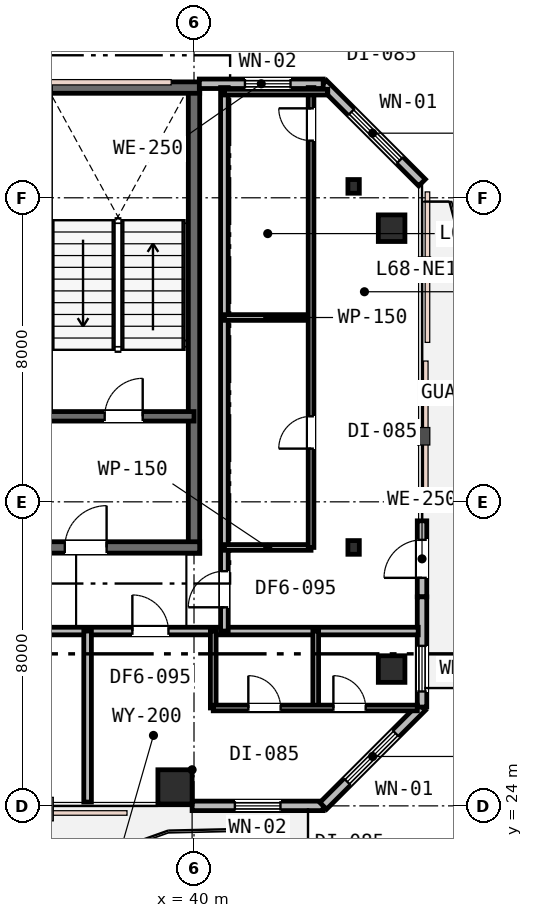
"""IFC4 building model, lengths in metres.
Left out: names, types, materials, properties, quantities, classifications, styles, units other than length and angle.
Written with IfcOpenShell. Run it as: python <this file> out.ifc"""

import sys

from ifc_helpers import new_model, si_unit, direction, frame, frame_2d, origin, origin_2d, place, context, subcontext, project, spatial, rectangle, i_section, extrude, element, fill, save


model = new_model("IFC4")
c1 = context("Model", 3, precision=1e-05, world=origin(), true_north=direction((0.0, 1.0)))
c2 = subcontext(c1, "Body", "Model", "MODEL_VIEW")
j1 = project(units=[si_unit("LENGTHUNIT", "METRE"), si_unit("PLANEANGLEUNIT", "RADIAN")], contexts=[c1])
p1 = place(None, origin())
s1 = spatial("IfcSite", under=j1, at=p1, CompositionType="ELEMENT")
p2 = place(p1, origin())
s2 = spatial("IfcBuilding", under=s1, at=p2, CompositionType="ELEMENT")
p3 = place(p2, frame((0.0, 0.0, 264.0)))
s3 = spatial("IfcBuildingStorey", under=s2, at=p3, CompositionType="ELEMENT", Elevation=264.0)
p4 = place(p3, frame((40.0, 30.65, 0.0), z_axis=(0.0, 0.0, 1.0), x_axis=(0.0, 1.0, 0.0)))
e1 = element("IfcWall", 1, at=p4, inside=s3, PredefinedType="SHEAR", context=c2, shape_type="SweptSolid", body=[
    extrude(rectangle(XDim=12.3, YDim=0.3, at=frame_2d((6.15, 0.0))), origin(), (0.0, 0.0, 1.0), 3.8),
])
p5 = place(p3, frame((15.85, 42.9, 0.0), z_axis=(0.0, 0.0, 1.0), x_axis=(1.0, 0.0, 0.0)))
e2 = element("IfcWall", 2, at=p5, inside=s3, PredefinedType="SHEAR", context=c2, shape_type="SweptSolid", body=[
    extrude(rectangle(XDim=24.3, YDim=0.3, at=frame_2d((12.15, 0.0))), origin(), (0.0, 0.0, 1.0), 3.8),
])
p6 = place(p3, frame((28.95, 30.8, 0.0), z_axis=(0.0, 0.0, 1.0), x_axis=(1.0, 0.0, 0.0)))
e3 = element("IfcWall", 3, at=p6, inside=s3, PredefinedType="SHEAR", context=c2, shape_type="SweptSolid", body=[
    extrude(rectangle(XDim=11.2, YDim=0.3, at=frame_2d((5.6, 0.0))), origin(), (0.0, 0.0, 1.0), 3.8),
])
p7 = place(p6, frame((7.65, 0.0, 0.0)))
e4 = element("IfcOpeningElement", 4, at=p7, cuts=e3, PredefinedType="OPENING", context=c2, shape_type="SweptSolid", body=[
    extrude(rectangle(XDim=1.1, YDim=2.15, at=frame_2d((0.55, 1.075))), frame((0.0, 0.16, 0.0), z_axis=(0.0, -1.0, 0.0), x_axis=(1.0, 0.0, 0.0)), (0.0, 0.0, 1.0), 0.32),
])
p8 = place(p3, frame((33.95, 34.25, 0.0), z_axis=(0.0, 0.0, 1.0), x_axis=(1.0, 0.0, 0.0)))
e5 = element("IfcWall", 5, at=p8, inside=s3, PredefinedType="SHEAR", context=c2, shape_type="SweptSolid", body=[
    extrude(rectangle(XDim=6.05, YDim=0.25, at=frame_2d((3.025, 0.0))), origin(), (0.0, 0.0, 1.0), 3.8),
])
p9 = place(p8, frame((3.7, 0.0, 0.0)))
e6 = element("IfcOpeningElement", 6, at=p9, cuts=e5, PredefinedType="OPENING", context=c2, shape_type="SweptSolid", body=[
    extrude(rectangle(XDim=1.0, YDim=2.15, at=frame_2d((0.5, 1.075))), frame((0.0, 0.135, 0.0), z_axis=(0.0, -1.0, 0.0), x_axis=(1.0, 0.0, 0.0)), (0.0, 0.0, 1.0), 0.27),
])
p10 = place(p8, frame((0.55, 0.0, 0.0)))
e7 = element("IfcOpeningElement", 7, at=p10, cuts=e5, PredefinedType="OPENING", context=c2, shape_type="SweptSolid", body=[
    extrude(rectangle(XDim=1.1, YDim=2.15, at=frame_2d((0.55, 1.075))), frame((0.0, 0.135, 0.0), z_axis=(0.0, -1.0, 0.0), x_axis=(1.0, 0.0, 0.0)), (0.0, 0.0, 1.0), 0.27),
])
p11 = place(p3, frame((39.5, 24.5, 0.0), z_axis=(0.0, 0.0, 1.0), x_axis=(1.0, 0.0, 0.0)))
e8 = element("IfcColumn", 8, at=p11, inside=s3, PredefinedType="COLUMN", context=c2, shape_type="SweptSolid", body=[
    extrude(rectangle(XDim=0.9, YDim=0.9, at=origin_2d()), origin(), (0.0, 0.0, 1.0), 3.8),
])
for number, where, z_axis, x_axis in (
    (9, (45.2, 27.6, 0.0), (0.0, 0.0, 1.0), (1.0, 0.0, 0.0)),
    (10, (45.2, 39.2, 0.0), (0.0, 0.0, 1.0), (1.0, 0.0, 0.0)),
):
    element("IfcColumn", number, at=place(p3, frame(where, z_axis=z_axis, x_axis=x_axis)), inside=s3, PredefinedType="COLUMN", context=c2, shape_type="SweptSolid", body=[
        extrude(rectangle(XDim=0.7, YDim=0.7, at=origin_2d()), origin(), (0.0, 0.0, 1.0), 3.8),
    ])
for number, where, z_axis, x_axis in (
    (11, (44.2, 30.8, 0.0), (0.0, 0.0, 1.0), (1.0, 0.0, 0.0)),
    (12, (44.2, 40.3, 0.0), (0.0, 0.0, 1.0), (1.0, 0.0, 0.0)),
):
    element("IfcColumn", number, at=place(p3, frame(where, z_axis=z_axis, x_axis=x_axis)), inside=s3, PredefinedType="COLUMN", context=c2, shape_type="SweptSolid", body=[
        extrude(i_section(OverallWidth=0.3, OverallDepth=0.36, WebThickness=0.013, FlangeThickness=0.022, FilletRadius=0.027, at=origin_2d()), origin(), (0.0, 0.0, 1.0), 3.8),
    ])
p12 = place(p3, frame((39.95, 24.0, 0.0), z_axis=(0.0, 0.0, 1.0), x_axis=(1.0, 0.0, 0.0)))
e13 = element("IfcWall", 13, at=p12, inside=s3, PredefinedType="STANDARD", context=c2, shape_type="SweptSolid", body=[
    extrude(rectangle(XDim=3.45, YDim=0.25, at=frame_2d((1.725, 0.0))), origin(), (0.0, 0.0, 1.0), 3.53),
])
p13 = place(p12, frame((1.125, 0.0, 0.85)))
e14 = element("IfcOpeningElement", 14, at=p13, cuts=e13, PredefinedType="OPENING", context=c2, shape_type="SweptSolid", body=[
    extrude(rectangle(XDim=1.2, YDim=1.6, at=frame_2d((0.6, 0.8))), frame((0.0, 0.135, 0.0), z_axis=(0.0, -1.0, 0.0), x_axis=(1.0, 0.0, 0.0)), (0.0, 0.0, 1.0), 0.27),
])
p14 = place(p3, frame((43.4, 24.0, 0.0), z_axis=(0.0, 0.0, 1.0), x_axis=(0.707106781187, 0.707106781187, 0.0)))
e15 = element("IfcWall", 15, at=p14, inside=s3, PredefinedType="STANDARD", context=c2, shape_type="SweptSolid", body=[
    extrude(rectangle(XDim=3.677, YDim=0.25, at=frame_2d((1.839, 0.0))), origin(), (0.0, 0.0, 1.0), 3.53),
])
p15 = place(p14, frame((0.896, 0.0, 0.75)))
e16 = element("IfcOpeningElement", 16, at=p15, cuts=e15, PredefinedType="OPENING", context=c2, shape_type="SweptSolid", body=[
    extrude(rectangle(XDim=1.8, YDim=1.85, at=frame_2d((0.9, 0.925))), frame((0.0, 0.135, 0.0), z_axis=(0.0, -1.0, 0.0), x_axis=(1.0, 0.0, 0.0)), (0.0, 0.0, 1.0), 0.27),
])
p16 = place(p3, frame((46.0, 29.5, 0.0), z_axis=(0.0, 0.0, 1.0), x_axis=(0.0, 1.0, 0.0)))
e17 = element("IfcWall", 17, at=p16, inside=s3, PredefinedType="STANDARD", context=c2, shape_type="SweptSolid", body=[
    extrude(rectangle(XDim=2.0, YDim=0.25, at=frame_2d((1.0, 0.0))), origin(), (0.0, 0.0, 1.0), 3.53),
])
p17 = place(p16, frame((0.5, 0.0, 0.0)))
e18 = element("IfcOpeningElement", 18, at=p17, cuts=e17, PredefinedType="OPENING", context=c2, shape_type="SweptSolid", body=[
    extrude(rectangle(XDim=1.0, YDim=2.15, at=frame_2d((0.5, 1.075))), frame((0.0, 0.135, 0.0), z_axis=(0.0, -1.0, 0.0), x_axis=(1.0, 0.0, 0.0)), (0.0, 0.0, 1.0), 0.27),
])
p18 = place(p3, frame((46.0, 26.6, 0.0), z_axis=(0.0, 0.0, 1.0), x_axis=(0.0, 1.0, 0.0)))
e19 = element("IfcWall", 19, at=p18, inside=s3, PredefinedType="STANDARD", context=c2, shape_type="SweptSolid", body=[
    extrude(rectangle(XDim=2.9, YDim=0.25, at=frame_2d((1.45, 0.0))), origin(), (0.0, 0.0, 1.0), 3.53),
])
p19 = place(p18, frame((0.41, 0.0, 0.85)))
e20 = element("IfcOpeningElement", 20, at=p19, cuts=e19, PredefinedType="OPENING", context=c2, shape_type="SweptSolid", body=[
    extrude(rectangle(XDim=1.2, YDim=1.6, at=frame_2d((0.6, 0.8))), frame((0.0, 0.135, 0.0), z_axis=(0.0, -1.0, 0.0), x_axis=(1.0, 0.0, 0.0)), (0.0, 0.0, 1.0), 0.27),
])
p20 = place(p3, frame((46.0, 40.4, 0.0), z_axis=(0.0, 0.0, 1.0), x_axis=(-0.707106781187, 0.707106781187, 0.0)))
e21 = element("IfcWall", 21, at=p20, inside=s3, PredefinedType="STANDARD", context=c2, shape_type="SweptSolid", body=[
    extrude(rectangle(XDim=3.677, YDim=0.25, at=frame_2d((1.839, 0.0))), origin(), (0.0, 0.0, 1.0), 3.53),
])
p21 = place(p20, frame((0.828, 0.0, 0.75)))
e22 = element("IfcOpeningElement", 22, at=p21, cuts=e21, PredefinedType="OPENING", context=c2, shape_type="SweptSolid", body=[
    extrude(rectangle(XDim=1.8, YDim=1.85, at=frame_2d((0.9, 0.925))), frame((0.0, 0.135, 0.0), z_axis=(0.0, -1.0, 0.0), x_axis=(1.0, 0.0, 0.0)), (0.0, 0.0, 1.0), 0.27),
])
p22 = place(p3, frame((43.4, 43.0, 0.0), z_axis=(0.0, 0.0, 1.0), x_axis=(-1.0, 0.0, 0.0)))
e23 = element("IfcWall", 23, at=p22, inside=s3, PredefinedType="STANDARD", context=c2, shape_type="SweptSolid", body=[
    extrude(rectangle(XDim=3.26, YDim=0.25, at=frame_2d((1.63, 0.0))), origin(), (0.0, 0.0, 1.0), 3.53),
])
p23 = place(p22, frame((0.86, 0.0, 0.85)))
e24 = element("IfcOpeningElement", 24, at=p23, cuts=e23, PredefinedType="OPENING", context=c2, shape_type="SweptSolid", body=[
    extrude(rectangle(XDim=1.2, YDim=1.6, at=frame_2d((0.6, 0.8))), frame((0.0, 0.135, 0.0), z_axis=(0.0, -1.0, 0.0), x_axis=(1.0, 0.0, 0.0)), (0.0, 0.0, 1.0), 0.27),
])
p24 = place(p3, frame((20.0, 28.6, 0.0), z_axis=(0.0, 0.0, 1.0), x_axis=(1.0, 0.0, 0.0)))
e25 = element("IfcWall", 25, at=p24, inside=s3, PredefinedType="PARTITIONING", context=c2, shape_type="SweptSolid", body=[
    extrude(rectangle(XDim=25.9, YDim=0.2, at=frame_2d((12.95, 0.0))), origin(), (0.0, 0.0, 1.0), 3.16),
])
p25 = place(p24, frame((7.025, 0.0, 0.0)))
e26 = element("IfcOpeningElement", 26, at=p25, cuts=e25, PredefinedType="OPENING", context=c2, shape_type="SweptSolid", body=[
    extrude(rectangle(XDim=0.95, YDim=2.15, at=frame_2d((0.475, 1.075))), frame((0.0, 0.11, 0.0), z_axis=(0.0, -1.0, 0.0), x_axis=(1.0, 0.0, 0.0)), (0.0, 0.0, 1.0), 0.22),
])
p26 = place(p24, frame((13.625, 0.0, 0.0)))
e27 = element("IfcOpeningElement", 27, at=p26, cuts=e25, PredefinedType="OPENING", context=c2, shape_type="SweptSolid", body=[
    extrude(rectangle(XDim=0.95, YDim=2.15, at=frame_2d((0.475, 1.075))), frame((0.0, 0.11, 0.0), z_axis=(0.0, -1.0, 0.0), x_axis=(1.0, 0.0, 0.0)), (0.0, 0.0, 1.0), 0.22),
])
p27 = place(p24, frame((18.378, 0.0, 0.0)))
e28 = element("IfcOpeningElement", 28, at=p27, cuts=e25, PredefinedType="OPENING", context=c2, shape_type="SweptSolid", body=[
    extrude(rectangle(XDim=0.95, YDim=2.15, at=frame_2d((0.475, 1.075))), frame((0.0, 0.11, 0.0), z_axis=(0.0, -1.0, 0.0), x_axis=(1.0, 0.0, 0.0)), (0.0, 0.0, 1.0), 0.22),
])
p28 = place(p3, frame((40.8, 28.6, 0.0), z_axis=(0.0, 0.0, 1.0), x_axis=(0.0, 1.0, 0.0)))
e29 = element("IfcWall", 29, at=p28, inside=s3, PredefinedType="PARTITIONING", context=c2, shape_type="SweptSolid", body=[
    extrude(rectangle(XDim=14.3, YDim=0.2, at=frame_2d((7.15, 0.0))), origin(), (0.0, 0.0, 1.0), 3.16),
])
p29 = place(p28, frame((0.625, 0.0, 0.0)))
e30 = element("IfcOpeningElement", 30, at=p29, cuts=e29, PredefinedType="OPENING", context=c2, shape_type="SweptSolid", body=[
    extrude(rectangle(XDim=0.95, YDim=2.15, at=frame_2d((0.475, 1.075))), frame((0.0, 0.11, 0.0), z_axis=(0.0, -1.0, 0.0), x_axis=(1.0, 0.0, 0.0)), (0.0, 0.0, 1.0), 0.22),
])
p30 = place(p3, frame((40.8, 30.8, 0.0), z_axis=(0.0, 0.0, 1.0), x_axis=(1.0, 0.0, 0.0)))
e31 = element("IfcWall", 31, at=p30, inside=s3, PredefinedType="PARTITIONING", context=c2, shape_type="SweptSolid", body=[
    extrude(rectangle(XDim=2.28, YDim=0.15, at=frame_2d((1.14, 0.0))), origin(), (0.0, 0.0, 1.0), 3.16),
])
p31 = place(p3, frame((40.8, 36.85, 0.0), z_axis=(0.0, 0.0, 1.0), x_axis=(1.0, 0.0, 0.0)))
e32 = element("IfcWall", 32, at=p31, inside=s3, PredefinedType="PARTITIONING", context=c2, shape_type="SweptSolid", body=[
    extrude(rectangle(XDim=2.28, YDim=0.15, at=frame_2d((1.14, 0.0))), origin(), (0.0, 0.0, 1.0), 3.53),
])
p32 = place(p3, frame((43.08, 30.8, 0.0), z_axis=(0.0, 0.0, 1.0), x_axis=(0.0, 1.0, 0.0)))
e33 = element("IfcWall", 33, at=p32, inside=s3, PredefinedType="PARTITIONING", context=c2, shape_type="SweptSolid", body=[
    extrude(rectangle(XDim=12.1, YDim=0.15, at=frame_2d((6.05, 0.0))), origin(), (0.0, 0.0, 1.0), 3.16),
])
p33 = place(p32, frame((2.6, 0.0, 0.0)))
e34 = element("IfcOpeningElement", 34, at=p33, cuts=e33, PredefinedType="OPENING", context=c2, shape_type="SweptSolid", body=[
    extrude(rectangle(XDim=0.85, YDim=2.15, at=frame_2d((0.425, 1.075))), frame((0.0, 0.085, 0.0), z_axis=(0.0, -1.0, 0.0), x_axis=(1.0, 0.0, 0.0)), (0.0, 0.0, 1.0), 0.17),
])
p34 = place(p32, frame((10.704, 0.0, 0.0)))
e35 = element("IfcOpeningElement", 35, at=p34, cuts=e33, PredefinedType="OPENING", context=c2, shape_type="SweptSolid", body=[
    extrude(rectangle(XDim=0.85, YDim=2.15, at=frame_2d((0.425, 1.075))), frame((0.0, 0.085, 0.0), z_axis=(0.0, -1.0, 0.0), x_axis=(1.0, 0.0, 0.0)), (0.0, 0.0, 1.0), 0.17),
])
p35 = place(p3, frame((40.8, 42.78, 0.0), z_axis=(0.0, 0.0, 1.0), x_axis=(1.0, 0.0, 0.0)))
e36 = element("IfcWall", 36, at=p35, inside=s3, PredefinedType="PARTITIONING", context=c2, shape_type="SweptSolid", body=[
    extrude(rectangle(XDim=2.72, YDim=0.15, at=frame_2d((1.36, 0.0))), origin(), (0.0, 0.0, 1.0), 3.53),
])
p36 = place(p3, frame((37.2, 24.1, 0.0), z_axis=(0.0, 0.0, 1.0), x_axis=(0.0, 1.0, 0.0)))
e37 = element("IfcWall", 37, at=p36, inside=s3, PredefinedType="PARTITIONING", context=c2, shape_type="SweptSolid", body=[
    extrude(rectangle(XDim=4.5, YDim=0.2, at=frame_2d((2.25, 0.0))), origin(), (0.0, 0.0, 1.0), 3.27),
])
for number, where, z_axis, x_axis in (
    (38, (40.506, 26.576, 0.0), (0.0, 0.0, 1.0), (0.0, 1.0, 0.0)),
    (39, (43.203, 26.576, 0.0), (0.0, 0.0, 1.0), (0.0, 1.0, 0.0)),
):
    element("IfcWall", number, at=place(p3, frame(where, z_axis=z_axis, x_axis=x_axis)), inside=s3, PredefinedType="PARTITIONING", context=c2, shape_type="SweptSolid", body=[
        extrude(rectangle(XDim=2.024, YDim=0.15, at=frame_2d((1.012, 0.0))), origin(), (0.0, 0.0, 1.0), 3.53),
    ])
p37 = place(p3, frame((40.506, 26.576, 0.0), z_axis=(0.0, 0.0, 1.0), x_axis=(1.0, 0.0, 0.0)))
e40 = element("IfcWall", 40, at=p37, inside=s3, PredefinedType="PARTITIONING", context=c2, shape_type="SweptSolid", body=[
    extrude(rectangle(XDim=5.37, YDim=0.15, at=frame_2d((2.685, 0.0))), origin(), (0.0, 0.0, 1.0), 3.53),
])
p38 = place(p37, frame((0.923, 0.0, 0.0)))
e41 = element("IfcOpeningElement", 41, at=p38, cuts=e40, PredefinedType="OPENING", context=c2, shape_type="SweptSolid", body=[
    extrude(rectangle(XDim=0.85, YDim=2.15, at=frame_2d((0.425, 1.075))), frame((0.0, 0.085, 0.0), z_axis=(0.0, -1.0, 0.0), x_axis=(1.0, 0.0, 0.0)), (0.0, 0.0, 1.0), 0.17),
])
p39 = place(p37, frame((3.162, 0.0, 0.0)))
e42 = element("IfcOpeningElement", 42, at=p39, cuts=e40, PredefinedType="OPENING", context=c2, shape_type="SweptSolid", body=[
    extrude(rectangle(XDim=0.85, YDim=2.15, at=frame_2d((0.425, 1.075))), frame((0.0, 0.085, 0.0), z_axis=(0.0, -1.0, 0.0), x_axis=(1.0, 0.0, 0.0)), (0.0, 0.0, 1.0), 0.17),
])
p40 = place(p13, origin())
e43 = element("IfcWindow", 43, at=p40, inside=s3, PartitioningType="SINGLE_PANEL", PredefinedType="WINDOW", context=c2, shape_type="SweptSolid", body=[
    extrude(rectangle(XDim=1.2, YDim=1.6, at=frame_2d((0.6, 0.8))), frame((0.0, 0.03, 0.0), z_axis=(0.0, -1.0, 0.0), x_axis=(1.0, 0.0, 0.0)), (0.0, 0.0, 1.0), 0.06),
])
fill(e14, e43)
p41 = place(p15, origin())
e44 = element("IfcWindow", 44, at=p41, inside=s3, PartitioningType="SINGLE_PANEL", PredefinedType="WINDOW", context=c2, shape_type="SweptSolid", body=[
    extrude(rectangle(XDim=1.8, YDim=1.85, at=frame_2d((0.9, 0.925))), frame((0.0, 0.03, 0.0), z_axis=(0.0, -1.0, 0.0), x_axis=(1.0, 0.0, 0.0)), (0.0, 0.0, 1.0), 0.06),
])
fill(e16, e44)
p42 = place(p17, origin())
e45 = element("IfcDoor", 45, at=p42, inside=s3, OperationType="SINGLE_SWING_LEFT", PredefinedType="DOOR", context=c2, shape_type="SweptSolid", body=[
    extrude(rectangle(XDim=1.0, YDim=2.15, at=frame_2d((0.5, 1.075))), frame((0.0, 0.025, 0.0), z_axis=(0.0, -1.0, 0.0), x_axis=(1.0, 0.0, 0.0)), (0.0, 0.0, 1.0), 0.05),
])
fill(e18, e45)
p43 = place(p19, origin())
e46 = element("IfcWindow", 46, at=p43, inside=s3, PartitioningType="SINGLE_PANEL", PredefinedType="WINDOW", context=c2, shape_type="SweptSolid", body=[
    extrude(rectangle(XDim=1.2, YDim=1.6, at=frame_2d((0.6, 0.8))), frame((0.0, 0.03, 0.0), z_axis=(0.0, -1.0, 0.0), x_axis=(1.0, 0.0, 0.0)), (0.0, 0.0, 1.0), 0.06),
])
fill(e20, e46)
p44 = place(p21, origin())
e47 = element("IfcWindow", 47, at=p44, inside=s3, PartitioningType="SINGLE_PANEL", PredefinedType="WINDOW", context=c2, shape_type="SweptSolid", body=[
    extrude(rectangle(XDim=1.8, YDim=1.85, at=frame_2d((0.9, 0.925))), frame((0.0, 0.03, 0.0), z_axis=(0.0, -1.0, 0.0), x_axis=(1.0, 0.0, 0.0)), (0.0, 0.0, 1.0), 0.06),
])
fill(e22, e47)
p45 = place(p23, origin())
e48 = element("IfcWindow", 48, at=p45, inside=s3, PartitioningType="SINGLE_PANEL", PredefinedType="WINDOW", context=c2, shape_type="SweptSolid", body=[
    extrude(rectangle(XDim=1.2, YDim=1.6, at=frame_2d((0.6, 0.8))), frame((0.0, 0.03, 0.0), z_axis=(0.0, -1.0, 0.0), x_axis=(1.0, 0.0, 0.0)), (0.0, 0.0, 1.0), 0.06),
])
fill(e24, e48)
p46 = place(p9, origin())
e49 = element("IfcDoor", 49, at=p46, inside=s3, OperationType="SINGLE_SWING_RIGHT", PredefinedType="DOOR", context=c2, shape_type="SweptSolid", body=[
    extrude(rectangle(XDim=1.0, YDim=2.15, at=frame_2d((0.5, 1.075))), frame((0.0, 0.025, 0.0), z_axis=(0.0, -1.0, 0.0), x_axis=(1.0, 0.0, 0.0)), (0.0, 0.0, 1.0), 0.05),
])
fill(e6, e49)
p47 = place(p7, origin())
e50 = element("IfcDoor", 50, at=p47, inside=s3, OperationType="SINGLE_SWING_RIGHT", PredefinedType="DOOR", context=c2, shape_type="SweptSolid", body=[
    extrude(rectangle(XDim=1.1, YDim=2.15, at=frame_2d((0.55, 1.075))), frame((0.0, 0.025, 0.0), z_axis=(0.0, -1.0, 0.0), x_axis=(1.0, 0.0, 0.0)), (0.0, 0.0, 1.0), 0.05),
])
fill(e4, e50)
p48 = place(p29, origin())
e51 = element("IfcDoor", 51, at=p48, inside=s3, OperationType="SINGLE_SWING_LEFT", PredefinedType="DOOR", context=c2, shape_type="SweptSolid", body=[
    extrude(rectangle(XDim=0.95, YDim=2.15, at=frame_2d((0.475, 1.075))), frame((0.0, 0.025, 0.0), z_axis=(0.0, -1.0, 0.0), x_axis=(1.0, 0.0, 0.0)), (0.0, 0.0, 1.0), 0.05),
])
fill(e30, e51)
p49 = place(p33, origin())
e52 = element("IfcDoor", 52, at=p49, inside=s3, OperationType="SINGLE_SWING_LEFT", PredefinedType="DOOR", context=c2, shape_type="SweptSolid", body=[
    extrude(rectangle(XDim=0.85, YDim=2.15, at=frame_2d((0.425, 1.075))), frame((0.0, 0.025, 0.0), z_axis=(0.0, -1.0, 0.0), x_axis=(1.0, 0.0, 0.0)), (0.0, 0.0, 1.0), 0.05),
])
fill(e34, e52)
p50 = place(p34, origin())
e53 = element("IfcDoor", 53, at=p50, inside=s3, OperationType="SINGLE_SWING_RIGHT", PredefinedType="DOOR", context=c2, shape_type="SweptSolid", body=[
    extrude(rectangle(XDim=0.85, YDim=2.15, at=frame_2d((0.425, 1.075))), frame((0.0, 0.025, 0.0), z_axis=(0.0, -1.0, 0.0), x_axis=(1.0, 0.0, 0.0)), (0.0, 0.0, 1.0), 0.05),
])
fill(e35, e53)
p51 = place(p27, origin())
e54 = element("IfcDoor", 54, at=p51, inside=s3, OperationType="SINGLE_SWING_LEFT", PredefinedType="DOOR", context=c2, shape_type="SweptSolid", body=[
    extrude(rectangle(XDim=0.95, YDim=2.15, at=frame_2d((0.475, 1.075))), frame((0.0, 0.025, 0.0), z_axis=(0.0, -1.0, 0.0), x_axis=(1.0, 0.0, 0.0)), (0.0, 0.0, 1.0), 0.05),
])
fill(e28, e54)
p52 = place(p38, origin())
e55 = element("IfcDoor", 55, at=p52, inside=s3, OperationType="SINGLE_SWING_LEFT", PredefinedType="DOOR", context=c2, shape_type="SweptSolid", body=[
    extrude(rectangle(XDim=0.85, YDim=2.15, at=frame_2d((0.425, 1.075))), frame((0.0, 0.025, 0.0), z_axis=(0.0, -1.0, 0.0), x_axis=(1.0, 0.0, 0.0)), (0.0, 0.0, 1.0), 0.05),
])
fill(e41, e55)
p53 = place(p39, origin())
e56 = element("IfcDoor", 56, at=p53, inside=s3, OperationType="SINGLE_SWING_LEFT", PredefinedType="DOOR", context=c2, shape_type="SweptSolid", body=[
    extrude(rectangle(XDim=0.85, YDim=2.15, at=frame_2d((0.425, 1.075))), frame((0.0, 0.025, 0.0), z_axis=(0.0, -1.0, 0.0), x_axis=(1.0, 0.0, 0.0)), (0.0, 0.0, 1.0), 0.05),
])
fill(e42, e56)
save(model, sys.argv[1])
